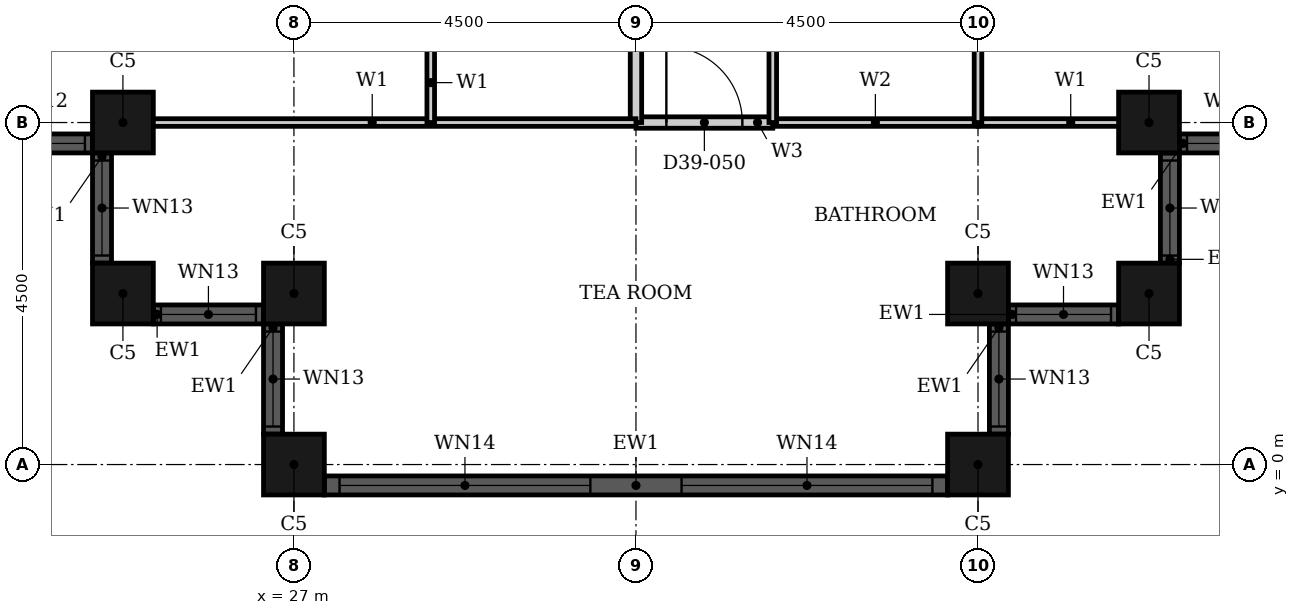
"""IFC4 building model, lengths in metres.
Left out: names, types, materials, properties, quantities, classifications, styles, units other than length and angle.
Written with IfcOpenShell. Run it as: python <this file> out.ifc"""

import sys

from ifc_helpers import new_model, si_unit, direction, frame, frame_2d, origin, origin_2d, place, context, subcontext, project, spatial, rectangle, hollow_rectangle, extrude, element, fill, save


model = new_model("IFC4")
c1 = context("Model", 3, precision=1e-05, world=origin(), true_north=direction((0.0, 1.0)))
c2 = subcontext(c1, "Body", "Model", "MODEL_VIEW")
j1 = project(units=[si_unit("LENGTHUNIT", "METRE"), si_unit("PLANEANGLEUNIT", "RADIAN")], contexts=[c1])
p1 = place(None, origin())
s1 = spatial("IfcSite", under=j1, at=p1, CompositionType="ELEMENT")
p2 = place(p1, origin())
s2 = spatial("IfcBuilding", under=s1, at=p2, CompositionType="ELEMENT")
p3 = place(p2, frame((0.0, 0.0, 158.0)))
s3 = spatial("IfcBuildingStorey", under=s2, at=p3, CompositionType="ELEMENT", Elevation=158.0)
for number, where, z_axis, x_axis in (
    (1, (24.75, 4.5, 0.0), (0.0, 0.0, 1.0), (1.0, 0.0, 0.0)),
    (2, (24.75, 2.25, 0.0), (0.0, 0.0, 1.0), (1.0, 0.0, 0.0)),
    (3, (27.0, 2.25, 0.0), (0.0, 0.0, 1.0), (1.0, 0.0, 0.0)),
    (4, (27.0, 0.0, 0.0), (0.0, 0.0, 1.0), (1.0, 0.0, 0.0)),
    (5, (36.0, 0.0, 0.0), (0.0, 0.0, 1.0), (1.0, 0.0, 0.0)),
    (6, (36.0, 2.25, 0.0), (0.0, 0.0, 1.0), (1.0, 0.0, 0.0)),
    (7, (38.25, 2.25, 0.0), (0.0, 0.0, 1.0), (1.0, 0.0, 0.0)),
    (8, (38.25, 4.5, 0.0), (0.0, 0.0, 1.0), (1.0, 0.0, 0.0)),
):
    element("IfcColumn", number, at=place(p3, frame(where, z_axis=z_axis, x_axis=x_axis)), inside=s3, PredefinedType="COLUMN", context=c2, shape_type="SweptSolid", body=[
        extrude(hollow_rectangle(XDim=0.8, YDim=0.8, WallThickness=0.025, at=origin_2d()), origin(), (0.0, 0.0, 1.0), 3.7),
    ])
p4 = place(p3, frame((22.9, 4.225, 0.0), z_axis=(0.0, 0.0, 1.0), x_axis=(1.0, 0.0, 0.0)))
e9 = element("IfcWall", 9, at=p4, inside=s3, PredefinedType="SOLIDWALL", context=c2, shape_type="SweptSolid", body=[
    extrude(rectangle(XDim=1.45, YDim=0.25, at=frame_2d((0.725, 0.0))), origin(), (0.0, 0.0, 1.0), 3.7),
])
p5 = place(p4, frame((0.1, 0.0, 0.9)))
e10 = element("IfcOpeningElement", 10, at=p5, cuts=e9, PredefinedType="OPENING", context=c2, shape_type="SweptSolid", body=[
    extrude(rectangle(XDim=1.25, YDim=2.08, at=frame_2d((0.625, 1.04))), frame((0.0, 0.135, 0.0), z_axis=(0.0, -1.0, 0.0), x_axis=(1.0, 0.0, 0.0)), (0.0, 0.0, 1.0), 0.27),
])
p6 = place(p3, frame((24.475, 4.1, 0.0), z_axis=(0.0, 0.0, 1.0), x_axis=(0.0, -1.0, 0.0)))
e11 = element("IfcWall", 11, at=p6, inside=s3, PredefinedType="SOLIDWALL", context=c2, shape_type="SweptSolid", body=[
    extrude(rectangle(XDim=1.45, YDim=0.25, at=frame_2d((0.725, 0.0))), origin(), (0.0, 0.0, 1.0), 3.7),
])
p7 = place(p6, frame((0.1, 0.0, 0.9)))
e12 = element("IfcOpeningElement", 12, at=p7, cuts=e11, PredefinedType="OPENING", context=c2, shape_type="SweptSolid", body=[
    extrude(rectangle(XDim=1.25, YDim=1.85, at=frame_2d((0.625, 0.925))), frame((0.0, 0.135, 0.0), z_axis=(0.0, -1.0, 0.0), x_axis=(1.0, 0.0, 0.0)), (0.0, 0.0, 1.0), 0.27),
])
p8 = place(p3, frame((25.15, 1.975, 0.0), z_axis=(0.0, 0.0, 1.0), x_axis=(1.0, 0.0, 0.0)))
e13 = element("IfcWall", 13, at=p8, inside=s3, PredefinedType="SOLIDWALL", context=c2, shape_type="SweptSolid", body=[
    extrude(rectangle(XDim=1.45, YDim=0.25, at=frame_2d((0.725, 0.0))), origin(), (0.0, 0.0, 1.0), 3.7),
])
p9 = place(p8, frame((0.1, 0.0, 0.9)))
e14 = element("IfcOpeningElement", 14, at=p9, cuts=e13, PredefinedType="OPENING", context=c2, shape_type="SweptSolid", body=[
    extrude(rectangle(XDim=1.25, YDim=1.85, at=frame_2d((0.625, 0.925))), frame((0.0, 0.135, 0.0), z_axis=(0.0, -1.0, 0.0), x_axis=(1.0, 0.0, 0.0)), (0.0, 0.0, 1.0), 0.27),
])
p10 = place(p3, frame((26.725, 1.85, 0.0), z_axis=(0.0, 0.0, 1.0), x_axis=(0.0, -1.0, 0.0)))
e15 = element("IfcWall", 15, at=p10, inside=s3, PredefinedType="SOLIDWALL", context=c2, shape_type="SweptSolid", body=[
    extrude(rectangle(XDim=1.45, YDim=0.25, at=frame_2d((0.725, 0.0))), origin(), (0.0, 0.0, 1.0), 3.7),
])
p11 = place(p10, frame((0.1, 0.0, 0.9)))
e16 = element("IfcOpeningElement", 16, at=p11, cuts=e15, PredefinedType="OPENING", context=c2, shape_type="SweptSolid", body=[
    extrude(rectangle(XDim=1.25, YDim=1.85, at=frame_2d((0.625, 0.925))), frame((0.0, 0.135, 0.0), z_axis=(0.0, -1.0, 0.0), x_axis=(1.0, 0.0, 0.0)), (0.0, 0.0, 1.0), 0.27),
])
p12 = place(p3, frame((27.4, -0.275, 0.0), z_axis=(0.0, 0.0, 1.0), x_axis=(1.0, 0.0, 0.0)))
e17 = element("IfcWall", 17, at=p12, inside=s3, PredefinedType="SOLIDWALL", context=c2, shape_type="SweptSolid", body=[
    extrude(rectangle(XDim=8.2, YDim=0.25, at=frame_2d((4.1, 0.0))), origin(), (0.0, 0.0, 1.0), 3.7),
])
p13 = place(p12, frame((0.2, 0.0, 0.45)))
e18 = element("IfcOpeningElement", 18, at=p13, cuts=e17, PredefinedType="OPENING", context=c2, shape_type="SweptSolid", body=[
    extrude(rectangle(XDim=3.3, YDim=2.53, at=frame_2d((1.65, 1.265))), frame((0.0, 0.135, 0.0), z_axis=(0.0, -1.0, 0.0), x_axis=(1.0, 0.0, 0.0)), (0.0, 0.0, 1.0), 0.27),
])
p14 = place(p12, frame((4.7, 0.0, 0.45)))
e19 = element("IfcOpeningElement", 19, at=p14, cuts=e17, PredefinedType="OPENING", context=c2, shape_type="SweptSolid", body=[
    extrude(rectangle(XDim=3.3, YDim=2.53, at=frame_2d((1.65, 1.265))), frame((0.0, 0.135, 0.0), z_axis=(0.0, -1.0, 0.0), x_axis=(1.0, 0.0, 0.0)), (0.0, 0.0, 1.0), 0.27),
])
p15 = place(p3, frame((36.275, 0.4, 0.0), z_axis=(0.0, 0.0, 1.0), x_axis=(0.0, 1.0, 0.0)))
e20 = element("IfcWall", 20, at=p15, inside=s3, PredefinedType="SOLIDWALL", context=c2, shape_type="SweptSolid", body=[
    extrude(rectangle(XDim=1.45, YDim=0.25, at=frame_2d((0.725, 0.0))), origin(), (0.0, 0.0, 1.0), 3.7),
])
p16 = place(p15, frame((0.1, 0.0, 0.9)))
e21 = element("IfcOpeningElement", 21, at=p16, cuts=e20, PredefinedType="OPENING", context=c2, shape_type="SweptSolid", body=[
    extrude(rectangle(XDim=1.25, YDim=1.85, at=frame_2d((0.625, 0.925))), frame((0.0, 0.135, 0.0), z_axis=(0.0, -1.0, 0.0), x_axis=(1.0, 0.0, 0.0)), (0.0, 0.0, 1.0), 0.27),
])
p17 = place(p3, frame((36.4, 1.975, 0.0), z_axis=(0.0, 0.0, 1.0), x_axis=(1.0, 0.0, 0.0)))
e22 = element("IfcWall", 22, at=p17, inside=s3, PredefinedType="SOLIDWALL", context=c2, shape_type="SweptSolid", body=[
    extrude(rectangle(XDim=1.45, YDim=0.25, at=frame_2d((0.725, 0.0))), origin(), (0.0, 0.0, 1.0), 3.7),
])
p18 = place(p17, frame((0.1, 0.0, 0.9)))
e23 = element("IfcOpeningElement", 23, at=p18, cuts=e22, PredefinedType="OPENING", context=c2, shape_type="SweptSolid", body=[
    extrude(rectangle(XDim=1.25, YDim=1.85, at=frame_2d((0.625, 0.925))), frame((0.0, 0.135, 0.0), z_axis=(0.0, -1.0, 0.0), x_axis=(1.0, 0.0, 0.0)), (0.0, 0.0, 1.0), 0.27),
])
p19 = place(p3, frame((38.525, 2.65, 0.0), z_axis=(0.0, 0.0, 1.0), x_axis=(0.0, 1.0, 0.0)))
e24 = element("IfcWall", 24, at=p19, inside=s3, PredefinedType="SOLIDWALL", context=c2, shape_type="SweptSolid", body=[
    extrude(rectangle(XDim=1.45, YDim=0.25, at=frame_2d((0.725, 0.0))), origin(), (0.0, 0.0, 1.0), 3.7),
])
p20 = place(p19, frame((0.1, 0.0, 0.9)))
e25 = element("IfcOpeningElement", 25, at=p20, cuts=e24, PredefinedType="OPENING", context=c2, shape_type="SweptSolid", body=[
    extrude(rectangle(XDim=1.25, YDim=1.85, at=frame_2d((0.625, 0.925))), frame((0.0, 0.135, 0.0), z_axis=(0.0, -1.0, 0.0), x_axis=(1.0, 0.0, 0.0)), (0.0, 0.0, 1.0), 0.27),
])
p21 = place(p3, frame((38.65, 4.225, 0.0), z_axis=(0.0, 0.0, 1.0), x_axis=(1.0, 0.0, 0.0)))
e26 = element("IfcWall", 26, at=p21, inside=s3, PredefinedType="SOLIDWALL", context=c2, shape_type="SweptSolid", body=[
    extrude(rectangle(XDim=1.45, YDim=0.25, at=frame_2d((0.725, 0.0))), origin(), (0.0, 0.0, 1.0), 3.7),
])
p22 = place(p21, frame((0.1, 0.0, 0.9)))
e27 = element("IfcOpeningElement", 27, at=p22, cuts=e26, PredefinedType="OPENING", context=c2, shape_type="SweptSolid", body=[
    extrude(rectangle(XDim=1.25, YDim=2.08, at=frame_2d((0.625, 1.04))), frame((0.0, 0.135, 0.0), z_axis=(0.0, -1.0, 0.0), x_axis=(1.0, 0.0, 0.0)), (0.0, 0.0, 1.0), 0.27),
])
p23 = place(p3, frame((31.5, 4.5, 0.0), z_axis=(0.0, 0.0, 1.0), x_axis=(1.0, 0.0, 0.0)))
e28 = element("IfcWall", 28, at=p23, inside=s3, PredefinedType="PARTITIONING", context=c2, shape_type="SweptSolid", body=[
    extrude(rectangle(XDim=1.8, YDim=0.15, at=frame_2d((0.9, 0.0))), origin(), (0.0, 0.0, 1.0), 3.4),
])
p24 = place(p23, frame((0.4, 0.0, 0.0)))
e29 = element("IfcOpeningElement", 29, at=p24, cuts=e28, PredefinedType="OPENING", context=c2, shape_type="SweptSolid", body=[
    extrude(rectangle(XDim=1.0, YDim=2.1, at=frame_2d((0.5, 1.05))), frame((0.0, 0.085, 0.0), z_axis=(0.0, -1.0, 0.0), x_axis=(1.0, 0.0, 0.0)), (0.0, 0.0, 1.0), 0.17),
])
p25 = place(p3, frame((31.5, 4.5, 0.0), z_axis=(0.0, 0.0, 1.0), x_axis=(0.0, 1.0, 0.0)))
e30 = element("IfcWall", 30, at=p25, inside=s3, PredefinedType="PARTITIONING", context=c2, shape_type="SweptSolid", body=[
    extrude(rectangle(XDim=6.6, YDim=0.15, at=frame_2d((3.3, 0.0))), origin(), (0.0, 0.0, 1.0), 2.68),
])
p26 = place(p25, frame((4.3, 0.0, 0.0)))
e31 = element("IfcOpeningElement", 31, at=p26, cuts=e30, PredefinedType="OPENING", context=c2, shape_type="SweptSolid", body=[
    extrude(rectangle(XDim=1.0, YDim=2.2, at=frame_2d((0.5, 1.1))), frame((0.0, 0.085, 0.0), z_axis=(0.0, -1.0, 0.0), x_axis=(1.0, 0.0, 0.0)), (0.0, 0.0, 1.0), 0.17),
])
p27 = place(p3, frame((36.0, 4.5, 0.0), z_axis=(0.0, 0.0, 1.0), x_axis=(1.0, 0.0, 0.0)))
e32 = element("IfcWall", 32, at=p27, inside=s3, PredefinedType="PARTITIONING", context=c2, shape_type="SweptSolid", body=[
    extrude(rectangle(XDim=2.44, YDim=0.1, at=frame_2d((1.22, 0.0))), origin(), (0.0, 0.0, 1.0), 3.4),
])
p28 = place(p3, frame((24.56, 4.5, 0.0), z_axis=(0.0, 0.0, 1.0), x_axis=(1.0, 0.0, 0.0)))
e33 = element("IfcWall", 33, at=p28, inside=s3, PredefinedType="PARTITIONING", context=c2, shape_type="SweptSolid", body=[
    extrude(rectangle(XDim=6.94, YDim=0.1, at=frame_2d((3.47, 0.0))), origin(), (0.0, 0.0, 1.0), 3.4),
])
p29 = place(p3, frame((28.8, 4.5, 0.0), z_axis=(0.0, 0.0, 1.0), x_axis=(0.0, 1.0, 0.0)))
e34 = element("IfcWall", 34, at=p29, inside=s3, PredefinedType="PARTITIONING", context=c2, shape_type="SweptSolid", body=[
    extrude(rectangle(XDim=3.0, YDim=0.1, at=frame_2d((1.5, 0.0))), origin(), (0.0, 0.0, 1.0), 3.4),
])
p30 = place(p29, frame((1.05, 0.0, 0.0)))
e35 = element("IfcOpeningElement", 35, at=p30, cuts=e34, PredefinedType="OPENING", context=c2, shape_type="SweptSolid", body=[
    extrude(rectangle(XDim=0.9, YDim=2.1, at=frame_2d((0.45, 1.05))), frame((0.0, 0.06, 0.0), z_axis=(0.0, -1.0, 0.0), x_axis=(1.0, 0.0, 0.0)), (0.0, 0.0, 1.0), 0.12),
])
p31 = place(p3, frame((33.3, 4.5, 0.0), z_axis=(0.0, 0.0, 1.0), x_axis=(1.0, 0.0, 0.0)))
e36 = element("IfcWall", 36, at=p31, inside=s3, PredefinedType="PARTITIONING", context=c2, shape_type="SweptSolid", body=[
    extrude(rectangle(XDim=2.7, YDim=0.1, at=frame_2d((1.35, 0.0))), origin(), (0.0, 0.0, 1.0), 3.4),
])
p32 = place(p3, frame((33.3, 4.5, 0.0), z_axis=(0.0, 0.0, 1.0), x_axis=(0.0, 1.0, 0.0)))
e37 = element("IfcWall", 37, at=p32, inside=s3, PredefinedType="PARTITIONING", context=c2, shape_type="SweptSolid", body=[
    extrude(rectangle(XDim=2.4, YDim=0.1, at=frame_2d((1.2, 0.0))), origin(), (0.0, 0.0, 1.0), 3.4),
])
p33 = place(p3, frame((36.0, 4.5, 0.0), z_axis=(0.0, 0.0, 1.0), x_axis=(0.0, 1.0, 0.0)))
e38 = element("IfcWall", 38, at=p33, inside=s3, PredefinedType="PARTITIONING", context=c2, shape_type="SweptSolid", body=[
    extrude(rectangle(XDim=2.4, YDim=0.1, at=frame_2d((1.2, 0.0))), origin(), (0.0, 0.0, 1.0), 2.68),
])
p34 = place(p5, origin())
e39 = element("IfcWindow", 39, at=p34, inside=s3, PartitioningType="SINGLE_PANEL", PredefinedType="WINDOW", context=c2, shape_type="SweptSolid", body=[
    extrude(rectangle(XDim=1.25, YDim=2.08, at=frame_2d((0.625, 1.04))), frame((0.0, 0.03, 0.0), z_axis=(0.0, -1.0, 0.0), x_axis=(1.0, 0.0, 0.0)), (0.0, 0.0, 1.0), 0.06),
])
fill(e10, e39)
p35 = place(p7, origin())
e40 = element("IfcWindow", 40, at=p35, inside=s3, PartitioningType="SINGLE_PANEL", PredefinedType="WINDOW", context=c2, shape_type="SweptSolid", body=[
    extrude(rectangle(XDim=1.25, YDim=1.85, at=frame_2d((0.625, 0.925))), frame((0.0, 0.03, 0.0), z_axis=(0.0, -1.0, 0.0), x_axis=(1.0, 0.0, 0.0)), (0.0, 0.0, 1.0), 0.06),
])
fill(e12, e40)
p36 = place(p9, origin())
e41 = element("IfcWindow", 41, at=p36, inside=s3, PartitioningType="SINGLE_PANEL", PredefinedType="WINDOW", context=c2, shape_type="SweptSolid", body=[
    extrude(rectangle(XDim=1.25, YDim=1.85, at=frame_2d((0.625, 0.925))), frame((0.0, 0.03, 0.0), z_axis=(0.0, -1.0, 0.0), x_axis=(1.0, 0.0, 0.0)), (0.0, 0.0, 1.0), 0.06),
])
fill(e14, e41)
p37 = place(p11, origin())
e42 = element("IfcWindow", 42, at=p37, inside=s3, PartitioningType="SINGLE_PANEL", PredefinedType="WINDOW", context=c2, shape_type="SweptSolid", body=[
    extrude(rectangle(XDim=1.25, YDim=1.85, at=frame_2d((0.625, 0.925))), frame((0.0, 0.03, 0.0), z_axis=(0.0, -1.0, 0.0), x_axis=(1.0, 0.0, 0.0)), (0.0, 0.0, 1.0), 0.06),
])
fill(e16, e42)
p38 = place(p13, origin())
e43 = element("IfcWindow", 43, at=p38, inside=s3, PartitioningType="SINGLE_PANEL", PredefinedType="WINDOW", context=c2, shape_type="SweptSolid", body=[
    extrude(rectangle(XDim=3.3, YDim=2.53, at=frame_2d((1.65, 1.265))), frame((0.0, 0.03, 0.0), z_axis=(0.0, -1.0, 0.0), x_axis=(1.0, 0.0, 0.0)), (0.0, 0.0, 1.0), 0.06),
])
fill(e18, e43)
p39 = place(p14, origin())
e44 = element("IfcWindow", 44, at=p39, inside=s3, PartitioningType="SINGLE_PANEL", PredefinedType="WINDOW", context=c2, shape_type="SweptSolid", body=[
    extrude(rectangle(XDim=3.3, YDim=2.53, at=frame_2d((1.65, 1.265))), frame((0.0, 0.03, 0.0), z_axis=(0.0, -1.0, 0.0), x_axis=(1.0, 0.0, 0.0)), (0.0, 0.0, 1.0), 0.06),
])
fill(e19, e44)
p40 = place(p16, origin())
e45 = element("IfcWindow", 45, at=p40, inside=s3, PartitioningType="SINGLE_PANEL", PredefinedType="WINDOW", context=c2, shape_type="SweptSolid", body=[
    extrude(rectangle(XDim=1.25, YDim=1.85, at=frame_2d((0.625, 0.925))), frame((0.0, 0.03, 0.0), z_axis=(0.0, -1.0, 0.0), x_axis=(1.0, 0.0, 0.0)), (0.0, 0.0, 1.0), 0.06),
])
fill(e21, e45)
p41 = place(p18, origin())
e46 = element("IfcWindow", 46, at=p41, inside=s3, PartitioningType="SINGLE_PANEL", PredefinedType="WINDOW", context=c2, shape_type="SweptSolid", body=[
    extrude(rectangle(XDim=1.25, YDim=1.85, at=frame_2d((0.625, 0.925))), frame((0.0, 0.03, 0.0), z_axis=(0.0, -1.0, 0.0), x_axis=(1.0, 0.0, 0.0)), (0.0, 0.0, 1.0), 0.06),
])
fill(e23, e46)
p42 = place(p20, origin())
e47 = element("IfcWindow", 47, at=p42, inside=s3, PartitioningType="SINGLE_PANEL", PredefinedType="WINDOW", context=c2, shape_type="SweptSolid", body=[
    extrude(rectangle(XDim=1.25, YDim=1.85, at=frame_2d((0.625, 0.925))), frame((0.0, 0.03, 0.0), z_axis=(0.0, -1.0, 0.0), x_axis=(1.0, 0.0, 0.0)), (0.0, 0.0, 1.0), 0.06),
])
fill(e25, e47)
p43 = place(p22, origin())
e48 = element("IfcWindow", 48, at=p43, inside=s3, PartitioningType="SINGLE_PANEL", PredefinedType="WINDOW", context=c2, shape_type="SweptSolid", body=[
    extrude(rectangle(XDim=1.25, YDim=2.08, at=frame_2d((0.625, 1.04))), frame((0.0, 0.03, 0.0), z_axis=(0.0, -1.0, 0.0), x_axis=(1.0, 0.0, 0.0)), (0.0, 0.0, 1.0), 0.06),
])
fill(e27, e48)
p44 = place(p24, origin())
e49 = element("IfcDoor", 49, at=p44, inside=s3, OperationType="SINGLE_SWING_LEFT", PredefinedType="DOOR", context=c2, shape_type="SweptSolid", body=[
    extrude(rectangle(XDim=1.0, YDim=2.1, at=frame_2d((0.5, 1.05))), frame((0.0, 0.025, 0.0), z_axis=(0.0, -1.0, 0.0), x_axis=(1.0, 0.0, 0.0)), (0.0, 0.0, 1.0), 0.05),
])
fill(e29, e49)
save(model, sys.argv[1])
